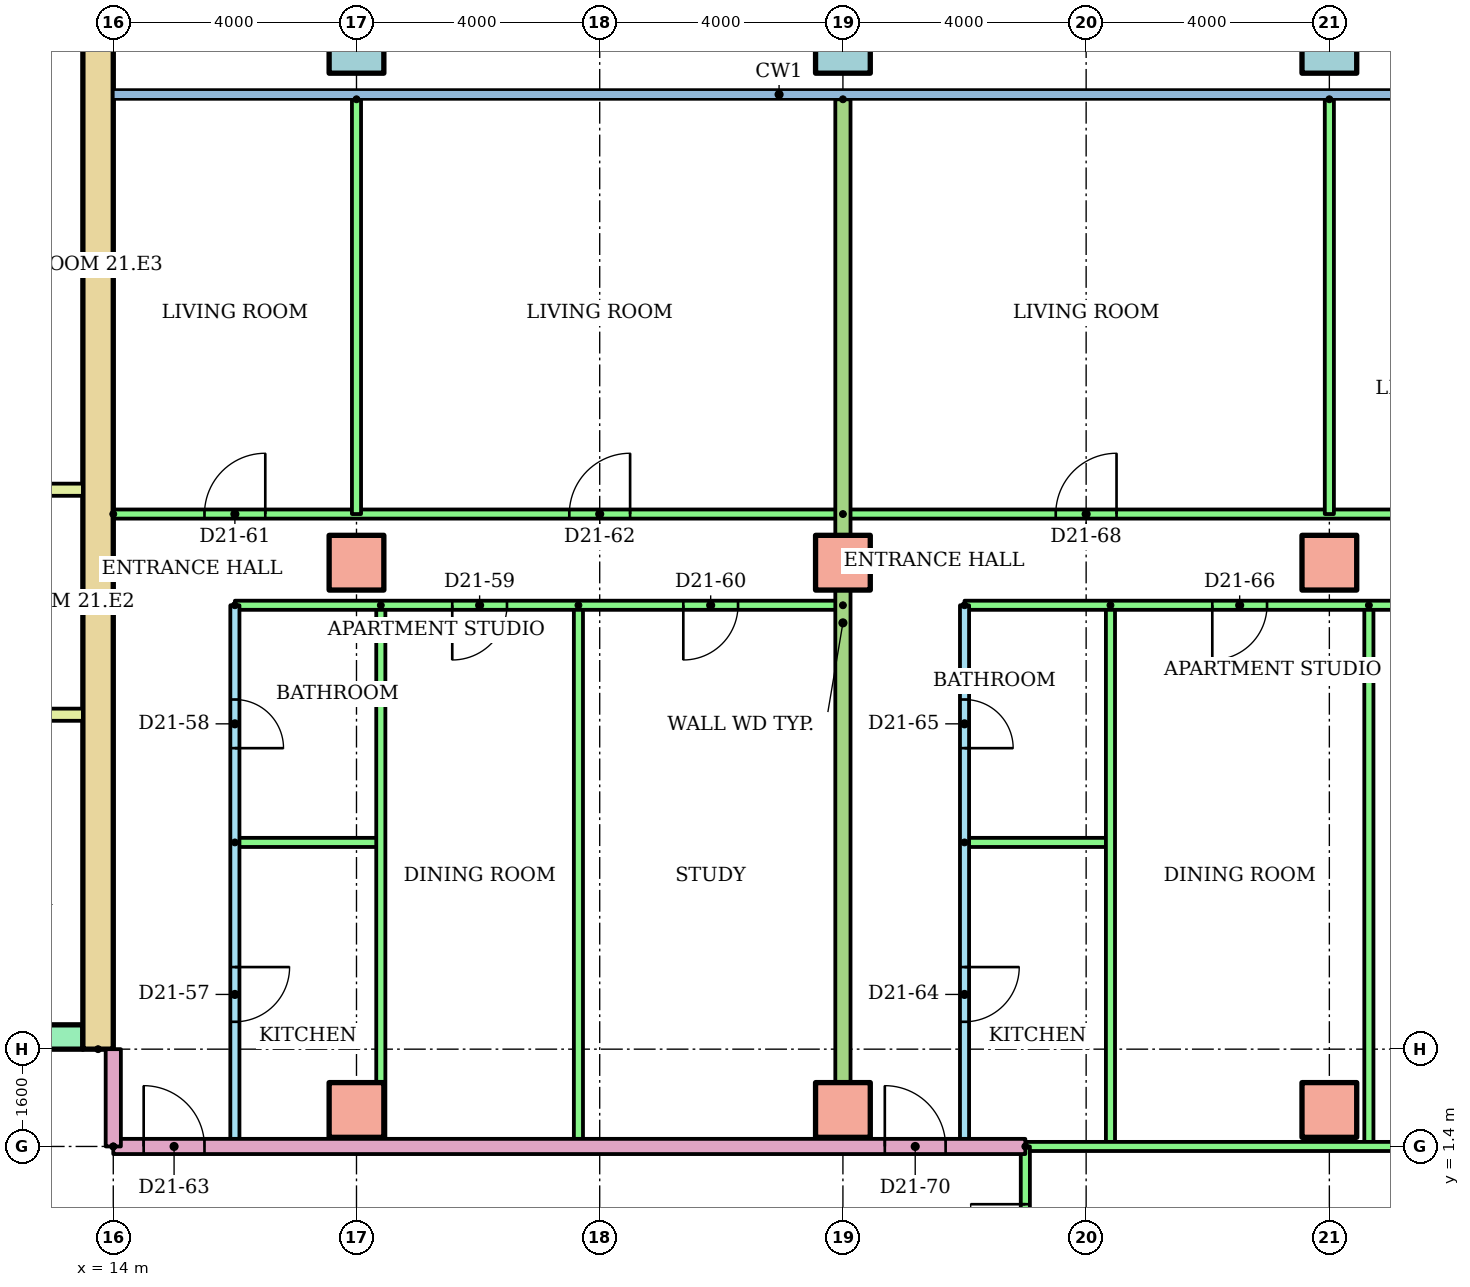
"""IFC4 building model, lengths in metres.
Left out: names, types, materials, properties, quantities, classifications, styles, units other than length and angle.
Written with IfcOpenShell. Run it as: python <this file> out.ifc"""

import sys

from ifc_helpers import new_model, si_unit, direction, frame, frame_2d, origin, origin_2d, place, context, subcontext, project, spatial, rectangle, hollow_rectangle, extrude, element, fill, save


model = new_model("IFC4")
c1 = context("Model", 3, precision=1e-05, world=origin(), true_north=direction((0.0, 1.0)))
c2 = subcontext(c1, "Body", "Model", "MODEL_VIEW")
j1 = project(units=[si_unit("LENGTHUNIT", "METRE"), si_unit("PLANEANGLEUNIT", "RADIAN")], contexts=[c1])
p1 = place(None, origin())
s1 = spatial("IfcSite", under=j1, at=p1, CompositionType="ELEMENT")
p2 = place(p1, origin())
s2 = spatial("IfcBuilding", under=s1, at=p2, CompositionType="ELEMENT")
p3 = place(p2, frame((0.0, 0.0, 83.9)))
s3 = spatial("IfcBuildingStorey", under=s2, at=p3, CompositionType="ELEMENT", Elevation=83.9)
for number, where in (
    (1, (18.0, 2.0, 0.0)),
    (2, (26.0, 2.0, 0.0)),
    (3, (34.0, 2.0, 0.0)),
    (4, (18.0, 11.0, 0.0)),
    (5, (26.0, 11.0, 0.0)),
    (6, (34.0, 11.0, 0.0)),
):
    element("IfcColumn", number, at=place(p3, frame(where)), inside=s3, PredefinedType="COLUMN", context=c2, shape_type="SweptSolid", body=[
        extrude(rectangle(XDim=0.9, YDim=0.9, at=origin_2d()), origin(), (0.0, 0.0, 1.0), 3.2),
    ])
for number, where in (
    (7, (18.0, 19.5, 0.0)),
    (8, (26.0, 19.5, 0.0)),
    (9, (34.0, 19.5, 0.0)),
):
    element("IfcColumn", number, at=place(p3, frame(where)), inside=s3, PredefinedType="COLUMN", context=c2, shape_type="SweptSolid", body=[
        extrude(hollow_rectangle(XDim=0.9, YDim=0.9, WallThickness=0.045, at=origin_2d()), origin(), (0.0, 0.0, 1.0), 3.2),
    ])
p4 = place(p3, frame((13.75, 3.0, 0.0), z_axis=(0.0, 0.0, 1.0), x_axis=(0.0, 1.0, 0.0)))
e10 = element("IfcWall", 10, at=p4, inside=s3, PredefinedType="SHEAR", context=c2, shape_type="SweptSolid", body=[
    extrude(rectangle(XDim=17.0, YDim=0.5, at=frame_2d((8.5, 0.0))), origin(), (0.0, 0.0, 1.0), 2.92),
])
p5 = place(p3, frame((-13.5, 3.2, 0.0)))
e11 = element("IfcWall", 11, at=p5, inside=s3, PredefinedType="SHEAR", context=c2, shape_type="SweptSolid", body=[
    extrude(rectangle(XDim=27.0, YDim=0.4, at=frame_2d((13.5, 0.0))), origin(), (0.0, 0.0, 1.0), 2.92),
])
p6 = place(p5, frame((6.861, 0.0, 0.0)))
e12 = element("IfcOpeningElement", 12, at=p6, cuts=e11, PredefinedType="OPENING", context=c2, shape_type="SweptSolid", body=[
    extrude(rectangle(XDim=1.1, YDim=2.1, at=frame_2d((0.55, 1.05))), frame((0.0, 0.21, 0.0), z_axis=(0.0, -1.0, 0.0), x_axis=(1.0, 0.0, 0.0)), (0.0, 0.0, 1.0), 0.42),
])
p7 = place(p5, frame((9.906, 0.0, 0.0)))
e13 = element("IfcOpeningElement", 13, at=p7, cuts=e11, PredefinedType="OPENING", context=c2, shape_type="SweptSolid", body=[
    extrude(rectangle(XDim=1.1, YDim=2.1, at=frame_2d((0.55, 1.05))), frame((0.0, 0.21, 0.0), z_axis=(0.0, -1.0, 0.0), x_axis=(1.0, 0.0, 0.0)), (0.0, 0.0, 1.0), 0.42),
])
p8 = place(p5, frame((15.994, 0.0, 0.0)))
e14 = element("IfcOpeningElement", 14, at=p8, cuts=e11, PredefinedType="OPENING", context=c2, shape_type="SweptSolid", body=[
    extrude(rectangle(XDim=1.1, YDim=2.1, at=frame_2d((0.55, 1.05))), frame((0.0, 0.21, 0.0), z_axis=(0.0, -1.0, 0.0), x_axis=(1.0, 0.0, 0.0)), (0.0, 0.0, 1.0), 0.42),
])
p9 = place(p5, frame((19.039, 0.0, 0.0)))
e15 = element("IfcOpeningElement", 15, at=p9, cuts=e11, PredefinedType="OPENING", context=c2, shape_type="SweptSolid", body=[
    extrude(rectangle(XDim=1.1, YDim=2.1, at=frame_2d((0.55, 1.05))), frame((0.0, 0.21, 0.0), z_axis=(0.0, -1.0, 0.0), x_axis=(1.0, 0.0, 0.0)), (0.0, 0.0, 1.0), 0.42),
])
p10 = place(p5, frame((12.6, 0.0, 0.0)))
e16 = element("IfcOpeningElement", 16, at=p10, cuts=e11, PredefinedType="OPENING", context=c2, shape_type="SweptSolid", body=[
    extrude(rectangle(XDim=1.8, YDim=2.1, at=frame_2d((0.9, 1.05))), frame((0.0, 0.21, 0.0), z_axis=(0.0, -1.0, 0.0), x_axis=(1.0, 0.0, 0.0)), (0.0, 0.0, 1.0), 0.42),
])
for number, where in (
    (17, (9.6, 8.5, 0.0)),
    (18, (9.6, 12.2, 0.0)),
):
    element("IfcWall", number, at=place(p3, frame(where)), inside=s3, PredefinedType="PARTITIONING", context=c2, shape_type="SweptSolid", body=[
        extrude(rectangle(XDim=3.9, YDim=0.2, at=frame_2d((1.95, 0.0))), origin(), (0.0, 0.0, 1.0), 2.92),
    ])
p11 = place(p3, frame((16.0, 10.3, 0.0), z_axis=(0.0, 0.0, 1.0), x_axis=(0.0, -1.0, 0.0)))
e19 = element("IfcWall", 19, at=p11, inside=s3, PredefinedType="PARTITIONING", context=c2, shape_type="SweptSolid", body=[
    extrude(rectangle(XDim=8.9, YDim=0.15, at=frame_2d((4.45, 0.0))), origin(), (0.0, 0.0, 1.0), 2.4),
])
p12 = place(p11, frame((5.95, 0.0, 0.0)))
e20 = element("IfcOpeningElement", 20, at=p12, cuts=e19, PredefinedType="OPENING", context=c2, shape_type="SweptSolid", body=[
    extrude(rectangle(XDim=0.9, YDim=2.1, at=frame_2d((0.45, 1.05))), frame((0.0, 0.085, 0.0), z_axis=(0.0, -1.0, 0.0), x_axis=(1.0, 0.0, 0.0)), (0.0, 0.0, 1.0), 0.17),
])
p13 = place(p11, frame((1.55, 0.0, 0.0)))
e21 = element("IfcOpeningElement", 21, at=p13, cuts=e19, PredefinedType="OPENING", context=c2, shape_type="SweptSolid", body=[
    extrude(rectangle(XDim=0.8, YDim=2.1, at=frame_2d((0.4, 1.05))), frame((0.0, 0.085, 0.0), z_axis=(0.0, -1.0, 0.0), x_axis=(1.0, 0.0, 0.0)), (0.0, 0.0, 1.0), 0.17),
])
p14 = place(p3, frame((16.0, 6.4, 0.0)))
e22 = element("IfcWall", 22, at=p14, inside=s3, PredefinedType="PARTITIONING", context=c2, shape_type="SweptSolid", body=[
    extrude(rectangle(XDim=2.4, YDim=0.15, at=frame_2d((1.2, 0.0))), origin(), (0.0, 0.0, 1.0), 2.4),
])
for number, where, z_axis, x_axis in (
    (23, (18.4, 10.3, 0.0), (0.0, 0.0, 1.0), (0.0, -1.0, 0.0)),
    (24, (21.65, 10.3, 0.0), (0.0, 0.0, 1.0), (0.0, -1.0, 0.0)),
):
    element("IfcWall", number, at=place(p3, frame(where, z_axis=z_axis, x_axis=x_axis)), inside=s3, PredefinedType="PARTITIONING", context=c2, shape_type="SweptSolid", body=[
        extrude(rectangle(XDim=8.9, YDim=0.15, at=frame_2d((4.45, 0.0))), origin(), (0.0, 0.0, 1.0), 2.4),
    ])
p15 = place(p3, frame((26.0, 10.3, 0.0), z_axis=(0.0, 0.0, 1.0), x_axis=(-1.0, 0.0, 0.0)))
e25 = element("IfcWall", 25, at=p15, inside=s3, PredefinedType="PARTITIONING", context=c2, shape_type="SweptSolid", body=[
    extrude(rectangle(XDim=10.0, YDim=0.15, at=frame_2d((5.0, 0.0))), origin(), (0.0, 0.0, 1.0), 2.4),
])
p16 = place(p15, frame((5.525, 0.0, 0.0)))
e26 = element("IfcOpeningElement", 26, at=p16, cuts=e25, PredefinedType="OPENING", context=c2, shape_type="SweptSolid", body=[
    extrude(rectangle(XDim=0.9, YDim=2.1, at=frame_2d((0.45, 1.05))), frame((0.0, 0.085, 0.0), z_axis=(0.0, -1.0, 0.0), x_axis=(1.0, 0.0, 0.0)), (0.0, 0.0, 1.0), 0.17),
])
p17 = place(p15, frame((1.725, 0.0, 0.0)))
e27 = element("IfcOpeningElement", 27, at=p17, cuts=e25, PredefinedType="OPENING", context=c2, shape_type="SweptSolid", body=[
    extrude(rectangle(XDim=0.9, YDim=2.1, at=frame_2d((0.45, 1.05))), frame((0.0, 0.085, 0.0), z_axis=(0.0, -1.0, 0.0), x_axis=(1.0, 0.0, 0.0)), (0.0, 0.0, 1.0), 0.17),
])
p18 = place(p3, frame((14.0, 11.8, 0.0)))
e28 = element("IfcWall", 28, at=p18, inside=s3, PredefinedType="PARTITIONING", context=c2, shape_type="SweptSolid", body=[
    extrude(rectangle(XDim=12.0, YDim=0.15, at=frame_2d((6.0, 0.0))), origin(), (0.0, 0.0, 1.0), 2.4),
])
p19 = place(p18, frame((1.5, 0.0, 0.0)))
e29 = element("IfcOpeningElement", 29, at=p19, cuts=e28, PredefinedType="OPENING", context=c2, shape_type="SweptSolid", body=[
    extrude(rectangle(XDim=1.0, YDim=2.1, at=frame_2d((0.5, 1.05))), frame((0.0, 0.085, 0.0), z_axis=(0.0, -1.0, 0.0), x_axis=(1.0, 0.0, 0.0)), (0.0, 0.0, 1.0), 0.17),
])
p20 = place(p18, frame((7.5, 0.0, 0.0)))
e30 = element("IfcOpeningElement", 30, at=p20, cuts=e28, PredefinedType="OPENING", context=c2, shape_type="SweptSolid", body=[
    extrude(rectangle(XDim=1.0, YDim=2.1, at=frame_2d((0.5, 1.05))), frame((0.0, 0.085, 0.0), z_axis=(0.0, -1.0, 0.0), x_axis=(1.0, 0.0, 0.0)), (0.0, 0.0, 1.0), 0.17),
])
p21 = place(p3, frame((18.0, 18.621, 0.0), z_axis=(0.0, 0.0, 1.0), x_axis=(0.0, -1.0, 0.0)))
e31 = element("IfcWall", 31, at=p21, inside=s3, PredefinedType="PARTITIONING", context=c2, shape_type="SweptSolid", body=[
    extrude(rectangle(XDim=6.821, YDim=0.15, at=frame_2d((3.411, 0.0))), origin(), (0.0, 0.0, 1.0), 2.4),
])
p22 = place(p3, frame((28.0, 10.3, 0.0), z_axis=(0.0, 0.0, 1.0), x_axis=(0.0, -1.0, 0.0)))
e32 = element("IfcWall", 32, at=p22, inside=s3, PredefinedType="PARTITIONING", context=c2, shape_type="SweptSolid", body=[
    extrude(rectangle(XDim=8.9, YDim=0.15, at=frame_2d((4.45, 0.0))), origin(), (0.0, 0.0, 1.0), 2.4),
])
p23 = place(p22, frame((5.95, 0.0, 0.0)))
e33 = element("IfcOpeningElement", 33, at=p23, cuts=e32, PredefinedType="OPENING", context=c2, shape_type="SweptSolid", body=[
    extrude(rectangle(XDim=0.9, YDim=2.1, at=frame_2d((0.45, 1.05))), frame((0.0, 0.085, 0.0), z_axis=(0.0, -1.0, 0.0), x_axis=(1.0, 0.0, 0.0)), (0.0, 0.0, 1.0), 0.17),
])
p24 = place(p22, frame((1.55, 0.0, 0.0)))
e34 = element("IfcOpeningElement", 34, at=p24, cuts=e32, PredefinedType="OPENING", context=c2, shape_type="SweptSolid", body=[
    extrude(rectangle(XDim=0.8, YDim=2.1, at=frame_2d((0.4, 1.05))), frame((0.0, 0.085, 0.0), z_axis=(0.0, -1.0, 0.0), x_axis=(1.0, 0.0, 0.0)), (0.0, 0.0, 1.0), 0.17),
])
p25 = place(p3, frame((28.0, 6.4, 0.0)))
e35 = element("IfcWall", 35, at=p25, inside=s3, PredefinedType="PARTITIONING", context=c2, shape_type="SweptSolid", body=[
    extrude(rectangle(XDim=2.4, YDim=0.15, at=frame_2d((1.2, 0.0))), origin(), (0.0, 0.0, 1.0), 2.4),
])
for number, where, z_axis, x_axis in (
    (36, (30.4, 10.3, 0.0), (0.0, 0.0, 1.0), (0.0, -1.0, 0.0)),
    (37, (34.65, 10.3, 0.0), (0.0, 0.0, 1.0), (0.0, -1.0, 0.0)),
):
    element("IfcWall", number, at=place(p3, frame(where, z_axis=z_axis, x_axis=x_axis)), inside=s3, PredefinedType="PARTITIONING", context=c2, shape_type="SweptSolid", body=[
        extrude(rectangle(XDim=8.9, YDim=0.15, at=frame_2d((4.45, 0.0))), origin(), (0.0, 0.0, 1.0), 2.4),
    ])
p26 = place(p3, frame((40.61, 10.3, 0.0), z_axis=(0.0, 0.0, 1.0), x_axis=(-1.0, 0.0, 0.0)))
e38 = element("IfcWall", 38, at=p26, inside=s3, PredefinedType="PARTITIONING", context=c2, shape_type="SweptSolid", body=[
    extrude(rectangle(XDim=12.61, YDim=0.15, at=frame_2d((6.305, 0.0))), origin(), (0.0, 0.0, 1.0), 2.4),
])
p27 = place(p26, frame((7.635, 0.0, 0.0)))
e39 = element("IfcOpeningElement", 39, at=p27, cuts=e38, PredefinedType="OPENING", context=c2, shape_type="SweptSolid", body=[
    extrude(rectangle(XDim=0.9, YDim=2.1, at=frame_2d((0.45, 1.05))), frame((0.0, 0.085, 0.0), z_axis=(0.0, -1.0, 0.0), x_axis=(1.0, 0.0, 0.0)), (0.0, 0.0, 1.0), 0.17),
])
p28 = place(p26, frame((2.635, 0.0, 0.0)))
e40 = element("IfcOpeningElement", 40, at=p28, cuts=e38, PredefinedType="OPENING", context=c2, shape_type="SweptSolid", body=[
    extrude(rectangle(XDim=0.9, YDim=2.1, at=frame_2d((0.45, 1.05))), frame((0.0, 0.085, 0.0), z_axis=(0.0, -1.0, 0.0), x_axis=(1.0, 0.0, 0.0)), (0.0, 0.0, 1.0), 0.17),
])
p29 = place(p3, frame((26.0, 11.8, 0.0)))
e41 = element("IfcWall", 41, at=p29, inside=s3, PredefinedType="PARTITIONING", context=c2, shape_type="SweptSolid", body=[
    extrude(rectangle(XDim=14.62, YDim=0.15, at=frame_2d((7.31, 0.0))), origin(), (0.0, 0.0, 1.0), 2.4),
])
p30 = place(p29, frame((3.5, 0.0, 0.0)))
e42 = element("IfcOpeningElement", 42, at=p30, cuts=e41, PredefinedType="OPENING", context=c2, shape_type="SweptSolid", body=[
    extrude(rectangle(XDim=1.0, YDim=2.1, at=frame_2d((0.5, 1.05))), frame((0.0, 0.085, 0.0), z_axis=(0.0, -1.0, 0.0), x_axis=(1.0, 0.0, 0.0)), (0.0, 0.0, 1.0), 0.17),
])
p31 = place(p29, frame((10.7, 0.0, 0.0)))
e43 = element("IfcOpeningElement", 43, at=p31, cuts=e41, PredefinedType="OPENING", context=c2, shape_type="SweptSolid", body=[
    extrude(rectangle(XDim=1.0, YDim=2.1, at=frame_2d((0.5, 1.05))), frame((0.0, 0.085, 0.0), z_axis=(0.0, -1.0, 0.0), x_axis=(1.0, 0.0, 0.0)), (0.0, 0.0, 1.0), 0.17),
])
p32 = place(p3, frame((34.0, 18.621, 0.0), z_axis=(0.0, 0.0, 1.0), x_axis=(0.0, -1.0, 0.0)))
e44 = element("IfcWall", 44, at=p32, inside=s3, PredefinedType="PARTITIONING", context=c2, shape_type="SweptSolid", body=[
    extrude(rectangle(XDim=6.821, YDim=0.15, at=frame_2d((3.411, 0.0))), origin(), (0.0, 0.0, 1.0), 2.4),
])
p33 = place(p3, frame((26.0, 18.621, 0.0), z_axis=(0.0, 0.0, 1.0), x_axis=(0.0, -1.0, 0.0)))
e45 = element("IfcWall", 45, at=p33, inside=s3, PredefinedType="PARTITIONING", context=c2, shape_type="SweptSolid", body=[
    extrude(rectangle(XDim=17.221, YDim=0.25, at=frame_2d((8.611, 0.0))), origin(), (0.0, 0.0, 1.0), 2.4),
])
p34 = place(p3, frame((14.0, 1.4, 0.0)))
e46 = element("IfcWall", 46, at=p34, inside=s3, PredefinedType="PARTITIONING", context=c2, shape_type="SweptSolid", body=[
    extrude(rectangle(XDim=15.0, YDim=0.25, at=frame_2d((7.5, 0.0))), origin(), (0.0, 0.0, 1.0), 2.4),
])
p35 = place(p34, frame((0.5, 0.0, 0.0)))
e47 = element("IfcOpeningElement", 47, at=p35, cuts=e46, PredefinedType="OPENING", context=c2, shape_type="SweptSolid", body=[
    extrude(rectangle(XDim=1.0, YDim=2.1, at=frame_2d((0.5, 1.05))), frame((0.0, 0.135, 0.0), z_axis=(0.0, -1.0, 0.0), x_axis=(1.0, 0.0, 0.0)), (0.0, 0.0, 1.0), 0.27),
])
p36 = place(p34, frame((12.689, 0.0, 0.0)))
e48 = element("IfcOpeningElement", 48, at=p36, cuts=e46, PredefinedType="OPENING", context=c2, shape_type="SweptSolid", body=[
    extrude(rectangle(XDim=1.0, YDim=2.1, at=frame_2d((0.5, 1.05))), frame((0.0, 0.135, 0.0), z_axis=(0.0, -1.0, 0.0), x_axis=(1.0, 0.0, 0.0)), (0.0, 0.0, 1.0), 0.27),
])
p37 = place(p3, frame((29.0, 1.4, 0.0)))
e49 = element("IfcWall", 49, at=p37, inside=s3, PredefinedType="PARTITIONING", context=c2, shape_type="SweptSolid", body=[
    extrude(rectangle(XDim=11.62, YDim=0.15, at=frame_2d((5.81, 0.0))), origin(), (0.0, 0.0, 1.0), 2.4),
])
p38 = place(p3, frame((29.0, -1.4, 0.0), z_axis=(0.0, 0.0, 1.0), x_axis=(0.0, 1.0, 0.0)))
e50 = element("IfcWall", 50, at=p38, inside=s3, PredefinedType="PARTITIONING", context=c2, shape_type="SweptSolid", body=[
    extrude(rectangle(XDim=2.8, YDim=0.15, at=frame_2d((1.4, 0.0))), origin(), (0.0, 0.0, 1.0), 2.4),
])
p39 = place(p38, frame((0.95, 0.0, 0.0)))
e51 = element("IfcOpeningElement", 51, at=p39, cuts=e50, PredefinedType="OPENING", context=c2, shape_type="SweptSolid", body=[
    extrude(rectangle(XDim=0.9, YDim=2.1, at=frame_2d((0.45, 1.05))), frame((0.0, 0.085, 0.0), z_axis=(0.0, -1.0, 0.0), x_axis=(1.0, 0.0, 0.0)), (0.0, 0.0, 1.0), 0.17),
])
p40 = place(p3, frame((14.0, 1.4, 0.0), z_axis=(0.0, 0.0, 1.0), x_axis=(0.0, 1.0, 0.0)))
e52 = element("IfcWall", 52, at=p40, inside=s3, PredefinedType="PARTITIONING", context=c2, shape_type="SweptSolid", body=[
    extrude(rectangle(XDim=1.6, YDim=0.25, at=frame_2d((0.8, 0.0))), origin(), (0.0, 0.0, 1.0), 2.4),
])
p41 = place(p12, origin())
e53 = element("IfcDoor", 53, at=p41, inside=s3, OperationType="SINGLE_SWING_LEFT", PredefinedType="DOOR", context=c2, shape_type="SweptSolid", body=[
    extrude(rectangle(XDim=0.9, YDim=2.1, at=frame_2d((0.45, 1.05))), frame((0.0, 0.025, 0.0), z_axis=(0.0, -1.0, 0.0), x_axis=(1.0, 0.0, 0.0)), (0.0, 0.0, 1.0), 0.05),
])
fill(e20, e53)
p42 = place(p13, origin())
e54 = element("IfcDoor", 54, at=p42, inside=s3, OperationType="SINGLE_SWING_RIGHT", PredefinedType="DOOR", context=c2, shape_type="SweptSolid", body=[
    extrude(rectangle(XDim=0.8, YDim=2.1, at=frame_2d((0.4, 1.05))), frame((0.0, 0.025, 0.0), z_axis=(0.0, -1.0, 0.0), x_axis=(1.0, 0.0, 0.0)), (0.0, 0.0, 1.0), 0.05),
])
fill(e21, e54)
p43 = place(p16, origin())
e55 = element("IfcDoor", 55, at=p43, inside=s3, OperationType="SINGLE_SWING_RIGHT", PredefinedType="DOOR", context=c2, shape_type="SweptSolid", body=[
    extrude(rectangle(XDim=0.9, YDim=2.1, at=frame_2d((0.45, 1.05))), frame((0.0, 0.025, 0.0), z_axis=(0.0, -1.0, 0.0), x_axis=(1.0, 0.0, 0.0)), (0.0, 0.0, 1.0), 0.05),
])
fill(e26, e55)
p44 = place(p17, origin())
e56 = element("IfcDoor", 56, at=p44, inside=s3, OperationType="SINGLE_SWING_RIGHT", PredefinedType="DOOR", context=c2, shape_type="SweptSolid", body=[
    extrude(rectangle(XDim=0.9, YDim=2.1, at=frame_2d((0.45, 1.05))), frame((0.0, 0.025, 0.0), z_axis=(0.0, -1.0, 0.0), x_axis=(1.0, 0.0, 0.0)), (0.0, 0.0, 1.0), 0.05),
])
fill(e27, e56)
p45 = place(p19, origin())
e57 = element("IfcDoor", 57, at=p45, inside=s3, OperationType="SINGLE_SWING_RIGHT", PredefinedType="DOOR", context=c2, shape_type="SweptSolid", body=[
    extrude(rectangle(XDim=1.0, YDim=2.1, at=frame_2d((0.5, 1.05))), frame((0.0, 0.025, 0.0), z_axis=(0.0, -1.0, 0.0), x_axis=(1.0, 0.0, 0.0)), (0.0, 0.0, 1.0), 0.05),
])
fill(e29, e57)
p46 = place(p20, origin())
e58 = element("IfcDoor", 58, at=p46, inside=s3, OperationType="SINGLE_SWING_RIGHT", PredefinedType="DOOR", context=c2, shape_type="SweptSolid", body=[
    extrude(rectangle(XDim=1.0, YDim=2.1, at=frame_2d((0.5, 1.05))), frame((0.0, 0.025, 0.0), z_axis=(0.0, -1.0, 0.0), x_axis=(1.0, 0.0, 0.0)), (0.0, 0.0, 1.0), 0.05),
])
fill(e30, e58)
p47 = place(p35, origin())
e59 = element("IfcDoor", 59, at=p47, inside=s3, OperationType="SINGLE_SWING_LEFT", PredefinedType="DOOR", context=c2, shape_type="SweptSolid", body=[
    extrude(rectangle(XDim=1.0, YDim=2.1, at=frame_2d((0.5, 1.05))), frame((0.0, 0.025, 0.0), z_axis=(0.0, -1.0, 0.0), x_axis=(1.0, 0.0, 0.0)), (0.0, 0.0, 1.0), 0.05),
])
fill(e47, e59)
p48 = place(p23, origin())
e60 = element("IfcDoor", 60, at=p48, inside=s3, OperationType="SINGLE_SWING_LEFT", PredefinedType="DOOR", context=c2, shape_type="SweptSolid", body=[
    extrude(rectangle(XDim=0.9, YDim=2.1, at=frame_2d((0.45, 1.05))), frame((0.0, 0.025, 0.0), z_axis=(0.0, -1.0, 0.0), x_axis=(1.0, 0.0, 0.0)), (0.0, 0.0, 1.0), 0.05),
])
fill(e33, e60)
p49 = place(p24, origin())
e61 = element("IfcDoor", 61, at=p49, inside=s3, OperationType="SINGLE_SWING_RIGHT", PredefinedType="DOOR", context=c2, shape_type="SweptSolid", body=[
    extrude(rectangle(XDim=0.8, YDim=2.1, at=frame_2d((0.4, 1.05))), frame((0.0, 0.025, 0.0), z_axis=(0.0, -1.0, 0.0), x_axis=(1.0, 0.0, 0.0)), (0.0, 0.0, 1.0), 0.05),
])
fill(e34, e61)
p50 = place(p27, origin())
e62 = element("IfcDoor", 62, at=p50, inside=s3, OperationType="SINGLE_SWING_RIGHT", PredefinedType="DOOR", context=c2, shape_type="SweptSolid", body=[
    extrude(rectangle(XDim=0.9, YDim=2.1, at=frame_2d((0.45, 1.05))), frame((0.0, 0.025, 0.0), z_axis=(0.0, -1.0, 0.0), x_axis=(1.0, 0.0, 0.0)), (0.0, 0.0, 1.0), 0.05),
])
fill(e39, e62)
p51 = place(p30, origin())
e63 = element("IfcDoor", 63, at=p51, inside=s3, OperationType="SINGLE_SWING_RIGHT", PredefinedType="DOOR", context=c2, shape_type="SweptSolid", body=[
    extrude(rectangle(XDim=1.0, YDim=2.1, at=frame_2d((0.5, 1.05))), frame((0.0, 0.025, 0.0), z_axis=(0.0, -1.0, 0.0), x_axis=(1.0, 0.0, 0.0)), (0.0, 0.0, 1.0), 0.05),
])
fill(e42, e63)
p52 = place(p36, origin())
e64 = element("IfcDoor", 64, at=p52, inside=s3, OperationType="SINGLE_SWING_LEFT", PredefinedType="DOOR", context=c2, shape_type="SweptSolid", body=[
    extrude(rectangle(XDim=1.0, YDim=2.1, at=frame_2d((0.5, 1.05))), frame((0.0, 0.025, 0.0), z_axis=(0.0, -1.0, 0.0), x_axis=(1.0, 0.0, 0.0)), (0.0, 0.0, 1.0), 0.05),
])
fill(e48, e64)
p53 = place(p39, origin())
e65 = element("IfcDoor", 65, at=p53, inside=s3, OperationType="SINGLE_SWING_RIGHT", PredefinedType="DOOR", context=c2, shape_type="SweptSolid", body=[
    extrude(rectangle(XDim=0.9, YDim=2.1, at=frame_2d((0.45, 1.05))), frame((0.0, 0.025, 0.0), z_axis=(0.0, -1.0, 0.0), x_axis=(1.0, 0.0, 0.0)), (0.0, 0.0, 1.0), 0.05),
])
fill(e51, e65)
save(model, sys.argv[1])
